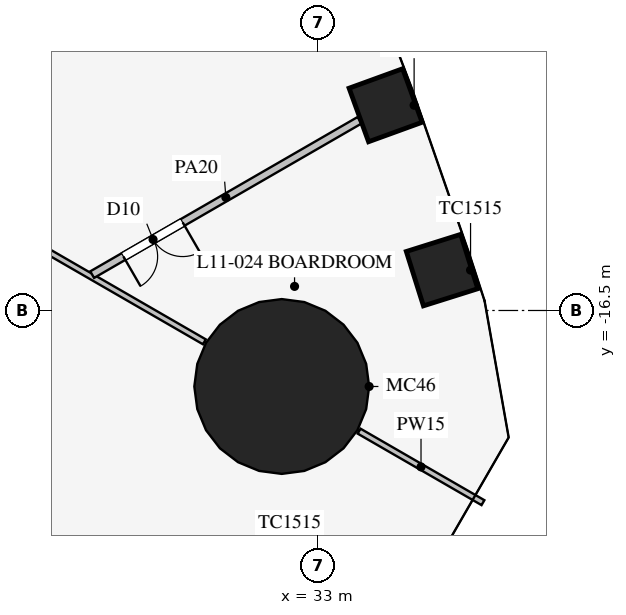
"""IFC4 building model, lengths in metres.
Left out: names, types, materials, properties, quantities, classifications, styles, units other than length and angle.
Written with IfcOpenShell. Run it as: python <this file> out.ifc"""

import sys

from ifc_helpers import new_model, si_unit, direction, frame, frame_2d, origin, origin_2d, place, context, subcontext, project, spatial, rectangle, circle, extrude, element, fill, save


model = new_model("IFC4")
c1 = context("Model", 3, precision=1e-05, world=origin(), true_north=direction((0.0, 1.0)))
c2 = subcontext(c1, "Body", "Model", "MODEL_VIEW")
j1 = project(units=[si_unit("LENGTHUNIT", "METRE"), si_unit("PLANEANGLEUNIT", "RADIAN")], contexts=[c1])
p1 = place(None, origin())
s1 = spatial("IfcSite", under=j1, at=p1, CompositionType="ELEMENT")
p2 = place(p1, origin())
s2 = spatial("IfcBuilding", under=s1, at=p2, CompositionType="ELEMENT")
p3 = place(p2, frame((0.0, 0.0, 50.1)))
s3 = spatial("IfcBuildingStorey", under=s2, at=p3, CompositionType="ELEMENT", Elevation=50.1)
for number, where, z_axis, x_axis in (
    (1, (36.262, -15.438, 0.0), (0.0, 0.0, 1.0), (-0.3, 0.954, 0.0)),
    (2, (34.776, -11.099, 0.0), (0.0, 0.0, 1.0), (-0.342, 0.94, 0.0)),
):
    element("IfcColumn", number, at=place(p3, frame(where, z_axis=z_axis, x_axis=x_axis)), inside=s3, PredefinedType="COLUMN", context=c2, shape_type="SweptSolid", body=[
        extrude(rectangle(XDim=1.5, YDim=1.5, at=origin_2d()), origin(), (0.0, 0.0, 1.0), 4.2),
    ])
p4 = place(p3, frame((32.043, -18.5, 0.0), z_axis=(0.0, 0.0, 1.0), x_axis=(1.0, 0.0, 0.0)))
e3 = element("IfcColumn", 3, at=p4, inside=s3, PredefinedType="COLUMN", context=c2, shape_type="SweptSolid", body=[
    extrude(circle(Radius=2.3, at=origin_2d()), origin(), (0.0, 0.0, 1.0), 4.2),
])
p5 = place(p3, frame((14.203, -8.2, 0.0), z_axis=(0.0, 0.0, 1.0), x_axis=(0.866024965723, -0.500000758745, 0.0)))
e4 = element("IfcWall", 4, at=p5, inside=s3, PredefinedType="PARTITIONING", context=c2, shape_type="SweptSolid", body=[
    extrude(rectangle(XDim=18.25, YDim=0.15, at=frame_2d((9.125, 0.0))), origin(), (0.0, 0.0, 1.0), 2.3),
])
p6 = place(p3, frame((34.078, -19.675, 0.0), z_axis=(0.0, 0.0, 1.0), x_axis=(0.866019247219, -0.500010663332, 0.0)))
e5 = element("IfcWall", 5, at=p6, inside=s3, PredefinedType="PARTITIONING", context=c2, shape_type="SweptSolid", body=[
    extrude(rectangle(XDim=3.764, YDim=0.15, at=frame_2d((1.882, 0.0))), origin(), (0.0, 0.0, 1.0), 2.3),
])
p7 = place(p3, frame((27.055, -15.557, 0.0), z_axis=(0.0, 0.0, 1.0), x_axis=(0.866026445548, 0.499998195608, 0.0)))
e6 = element("IfcWall", 6, at=p7, inside=s3, PredefinedType="PARTITIONING", context=c2, shape_type="SweptSolid", body=[
    extrude(rectangle(XDim=8.124, YDim=0.2, at=frame_2d((4.062, 0.0))), origin(), (0.0, 0.0, 1.0), 2.9),
])
p8 = place(p7, frame((0.95, 0.0, 0.15)))
e7 = element("IfcOpeningElement", 7, at=p8, cuts=e6, PredefinedType="OPENING", context=c2, shape_type="SweptSolid", body=[
    extrude(rectangle(XDim=1.8, YDim=2.1, at=frame_2d((0.9, 1.05))), frame((0.0, 0.11, 0.0), z_axis=(0.0, -1.0, 0.0), x_axis=(1.0, 0.0, 0.0)), (0.0, 0.0, 1.0), 0.22),
])
p9 = place(p8, frame((1.8, 0.0, 0.0), z_axis=(0.0, 0.0, 1.0), x_axis=(-1.0, 0.0, 0.0)))
e8 = element("IfcDoor", 8, at=p9, inside=s3, OperationType="DOUBLE_DOOR_SINGLE_SWING", PredefinedType="DOOR", context=c2, shape_type="SweptSolid", body=[
    extrude(rectangle(XDim=1.8, YDim=2.1, at=frame_2d((0.9, 1.05))), frame((0.0, 0.025, 0.0), z_axis=(0.0, -1.0, 0.0), x_axis=(1.0, 0.0, 0.0)), (0.0, 0.0, 1.0), 0.05),
])
fill(e7, e8)
save(model, sys.argv[1])
